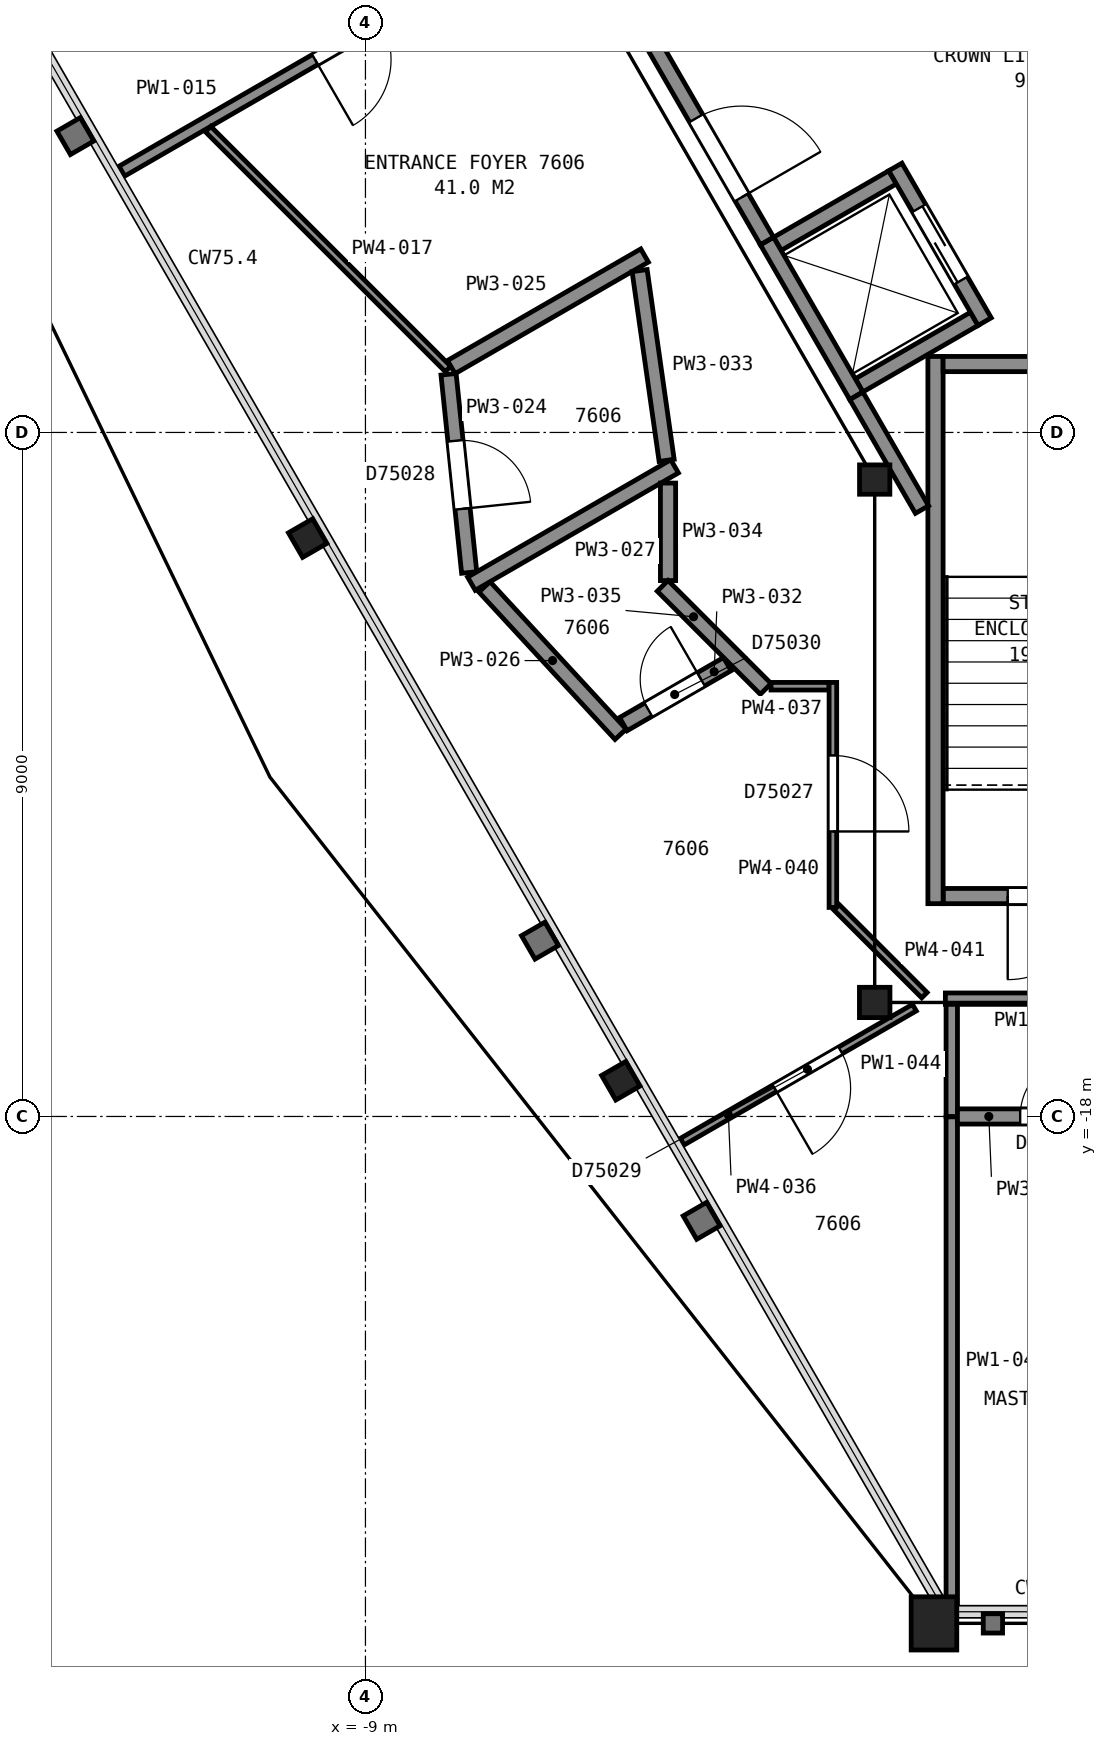
"""IFC4 building model, lengths in metres.
Left out: names, types, materials, properties, quantities, classifications, styles, units other than length and angle.
Written with IfcOpenShell. Run it as: python <this file> out.ifc"""

import sys

from ifc_helpers import new_model, si_unit, direction, frame, frame_2d, origin, origin_2d, place, context, subcontext, project, spatial, rectangle, hollow_rectangle, i_section, extrude, element, fill, save


model = new_model("IFC4")
c1 = context("Model", 3, precision=1e-05, world=origin(), true_north=direction((0.0, 1.0)))
c2 = subcontext(c1, "Body", "Model", "MODEL_VIEW")
j1 = project(units=[si_unit("LENGTHUNIT", "METRE"), si_unit("PLANEANGLEUNIT", "RADIAN")], contexts=[c1])
p1 = place(None, origin())
s1 = spatial("IfcSite", under=j1, at=p1, CompositionType="ELEMENT")
p2 = place(p1, origin())
s2 = spatial("IfcBuilding", under=s1, at=p2, CompositionType="ELEMENT")
p3 = place(p2, frame((0.0, 0.0, 301.0)))
s3 = spatial("IfcBuildingStorey", under=s2, at=p3, CompositionType="ELEMENT", Elevation=301.0)
p4 = place(p3, frame((-9.76, -10.39, 0.0), z_axis=(0.0, 0.0, 1.0), x_axis=(-0.5, 0.866025403784, 0.0)))
e1 = element("IfcColumn", 1, at=p4, inside=s3, PredefinedType="COLUMN", context=c2, shape_type="SweptSolid", body=[
    extrude(i_section(OverallWidth=0.373, OverallDepth=0.368, WebThickness=0.015, FlangeThickness=0.024, FilletRadius=0.015, at=origin_2d()), origin(), (0.0, 0.0, 1.0), 3.655),
])
p5 = place(p3, frame((-5.64, -17.53, 0.0), z_axis=(0.0, 0.0, 1.0), x_axis=(-0.5, 0.866025403784, 0.0)))
e2 = element("IfcColumn", 2, at=p5, inside=s3, PredefinedType="COLUMN", context=c2, shape_type="SweptSolid", body=[
    extrude(i_section(OverallWidth=0.373, OverallDepth=0.368, WebThickness=0.015, FlangeThickness=0.024, FilletRadius=0.015, at=origin_2d()), origin(), (0.0, 0.0, 1.0), 3.645),
])
p6 = place(p3, frame((-1.52, -24.67, 0.0), z_axis=(0.0, 0.0, 1.0), x_axis=(-1.0, 0.0, 0.0)))
e3 = element("IfcColumn", 3, at=p6, inside=s3, PredefinedType="COLUMN", context=c2, shape_type="SweptSolid", body=[
    extrude(hollow_rectangle(XDim=0.6, YDim=0.7, WallThickness=0.04, at=origin_2d()), origin(), (0.0, 0.0, 1.0), 3.61),
])
p7 = place(p3, frame((-2.3, -9.62, 0.0), z_axis=(0.0, 0.0, 1.0), x_axis=(1.0, 0.0, 0.0)))
e4 = element("IfcColumn", 4, at=p7, inside=s3, PredefinedType="COLUMN", context=c2, shape_type="SweptSolid", body=[
    extrude(i_section(OverallWidth=0.399, OverallDepth=0.386, WebThickness=0.021, FlangeThickness=0.033, FilletRadius=0.015, at=origin_2d()), origin(), (0.0, 0.0, 1.0), 3.7),
])
p8 = place(p3, frame((-2.3, -16.5, 0.0), z_axis=(0.0, 0.0, 1.0), x_axis=(-1.0, 0.0, 0.0)))
e5 = element("IfcColumn", 5, at=p8, inside=s3, PredefinedType="COLUMN", context=c2, shape_type="SweptSolid", body=[
    extrude(i_section(OverallWidth=0.401, OverallDepth=0.399, WebThickness=0.025, FlangeThickness=0.04, FilletRadius=0.015, at=origin_2d()), origin(), (0.0, 0.0, 1.0), 3.7),
])
p9 = place(p3, frame((-1.4, -15.1, 0.0), z_axis=(0.0, 0.0, 1.0), x_axis=(1.0, 0.0, 0.0)))
e6 = element("IfcWall", 6, at=p9, inside=s3, PredefinedType="PARTITIONING", context=c2, shape_type="SweptSolid", body=[
    extrude(rectangle(XDim=2.8, YDim=0.2, at=frame_2d((1.4, 0.0))), origin(), (0.0, 0.0, 1.0), 3.45),
])
p10 = place(p9, frame((0.85, 0.0, 0.0)))
e7 = element("IfcOpeningElement", 7, at=p10, cuts=e6, PredefinedType="OPENING", context=c2, shape_type="SweptSolid", body=[
    extrude(rectangle(XDim=1.1, YDim=2.1, at=frame_2d((0.55, 1.05))), frame((0.0, 0.11, 0.0), z_axis=(0.0, -1.0, 0.0), x_axis=(1.0, 0.0, 0.0)), (0.0, 0.0, 1.0), 0.22),
])
p11 = place(p3, frame((-1.5, -8.0, 0.0), z_axis=(0.0, 0.0, 1.0), x_axis=(0.0, -1.0, 0.0)))
e8 = element("IfcWall", 8, at=p11, inside=s3, PredefinedType="PARTITIONING", context=c2, shape_type="SweptSolid", body=[
    extrude(rectangle(XDim=7.2, YDim=0.2, at=frame_2d((3.6, 0.0))), origin(), (0.0, 0.0, 1.0), 3.45),
])
p12 = place(p3, frame((-1.4, -8.1, 0.0), z_axis=(0.0, 0.0, 1.0), x_axis=(1.0, 0.0, 0.0)))
e9 = element("IfcWall", 9, at=p12, inside=s3, PredefinedType="PARTITIONING", context=c2, shape_type="SweptSolid", body=[
    extrude(rectangle(XDim=2.8, YDim=0.2, at=frame_2d((1.4, 0.0))), origin(), (0.0, 0.0, 1.0), 3.45),
])
for number, where, z_axis, x_axis in (
    (10, (-2.505, -8.38, 0.0), (0.0, 0.0, 1.0), (0.866, 0.5, 0.0)),
    (11, (-3.58, -6.519, 0.0), (0.0, 0.0, 1.0), (0.866, 0.5, 0.0)),
):
    element("IfcWall", number, at=place(p3, frame(where, z_axis=z_axis, x_axis=x_axis)), inside=s3, PredefinedType="PARTITIONING", context=c2, shape_type="SweptSolid", body=[
        extrude(rectangle(XDim=1.75, YDim=0.2, at=frame_2d((0.875, 0.0))), origin(), (0.0, 0.0, 1.0), 3.7),
    ])
p13 = place(p3, frame((-0.853, -7.542, 0.0), z_axis=(0.0, 0.0, 1.0), x_axis=(-0.500016218704, 0.866016039709, 0.0)))
e12 = element("IfcWall", 12, at=p13, inside=s3, PredefinedType="PARTITIONING", context=c2, shape_type="SweptSolid", body=[
    extrude(rectangle(XDim=2.35, YDim=0.2, at=frame_2d((1.175, 0.0))), origin(), (0.0, 0.0, 1.0), 3.7),
])
p14 = place(p13, frame((0.625, 0.0, 0.0)))
e13 = element("IfcOpeningElement", 13, at=p14, cuts=e12, PredefinedType="OPENING", context=c2, shape_type="SweptSolid", body=[
    extrude(rectangle(XDim=1.1, YDim=2.1, at=frame_2d((0.55, 1.05))), frame((0.0, 0.11, 0.0), z_axis=(0.0, -1.0, 0.0), x_axis=(1.0, 0.0, 0.0)), (0.0, 0.0, 1.0), 0.22),
])
p15 = place(p3, frame((-2.542, -8.517, 0.0), z_axis=(0.0, 0.0, 1.0), x_axis=(-0.500016218704, 0.866016039709, 0.0)))
e14 = element("IfcWall", 14, at=p15, inside=s3, PredefinedType="PARTITIONING", context=c2, shape_type="SweptSolid", body=[
    extrude(rectangle(XDim=2.35, YDim=0.2, at=frame_2d((1.175, 0.0))), origin(), (0.0, 0.0, 1.0), 3.7),
])
p16 = place(p3, frame((-7.141, -0.551, 0.0), z_axis=(0.0, 0.0, 1.0), x_axis=(0.500001302854, -0.86602465158, 0.0)))
e15 = element("IfcWall", 15, at=p16, inside=s3, PredefinedType="PARTITIONING", context=c2, shape_type="SweptSolid", body=[
    extrude(rectangle(XDim=6.846, YDim=0.2, at=frame_2d((3.423, 0.0))), origin(), (0.0, 0.0, 1.0), 3.45),
])
p17 = place(p16, frame((4.983, 0.0, 0.0)))
e16 = element("IfcOpeningElement", 16, at=p17, cuts=e15, PredefinedType="OPENING", context=c2, shape_type="SweptSolid", body=[
    extrude(rectangle(XDim=1.2, YDim=2.1, at=frame_2d((0.6, 1.05))), frame((0.0, 0.11, 0.0), z_axis=(0.0, -1.0, 0.0), x_axis=(1.0, 0.0, 0.0)), (0.0, 0.0, 1.0), 0.22),
])
p18 = place(p3, frame((-2.541, -8.519, 0.0), z_axis=(0.0, 0.0, 1.0), x_axis=(0.500016142392, -0.86601608377, 0.0)))
e17 = element("IfcWall", 17, at=p18, inside=s3, PredefinedType="PARTITIONING", context=c2, shape_type="SweptSolid", body=[
    extrude(rectangle(XDim=1.727, YDim=0.2, at=frame_2d((0.864, 0.0))), origin(), (0.0, 0.0, 1.0), 3.45),
])
p19 = place(p3, frame((-12.205, -5.562, 0.0), z_axis=(0.0, 0.0, 1.0), x_axis=(0.866006351856, 0.500032997455, 0.0)))
e18 = element("IfcWall", 18, at=p19, inside=s3, PredefinedType="PARTITIONING", context=c2, shape_type="SweptSolid", body=[
    extrude(rectangle(XDim=5.671, YDim=0.15, at=frame_2d((2.835, 0.0))), origin(), (0.0, 0.0, 1.0), 2.723),
])
p20 = place(p19, frame((2.935, 0.0, 0.0)))
e19 = element("IfcOpeningElement", 19, at=p20, cuts=e18, PredefinedType="OPENING", context=c2, shape_type="SweptSolid", body=[
    extrude(rectangle(XDim=1.0, YDim=2.1, at=frame_2d((0.5, 1.05))), frame((0.0, 0.085, 0.0), z_axis=(0.0, -1.0, 0.0), x_axis=(1.0, 0.0, 0.0)), (0.0, 0.0, 1.0), 0.17),
])
p21 = place(p3, frame((-11.071, -5.008, 0.0), z_axis=(0.0, 0.0, 1.0), x_axis=(0.707079435951, -0.707134125365, 0.0)))
e20 = element("IfcWall", 20, at=p21, inside=s3, PredefinedType="PARTITIONING", context=c2, shape_type="SweptSolid", body=[
    extrude(rectangle(XDim=4.464, YDim=0.1, at=frame_2d((2.232, 0.0))), origin(), (0.0, 0.0, 1.0), 2.723),
])
p22 = place(p3, frame((-7.907, -8.235, 0.0), z_axis=(0.0, 0.0, 1.0), x_axis=(0.103623353624, -0.994616609847, 0.0)))
e21 = element("IfcWall", 21, at=p22, inside=s3, PredefinedType="PARTITIONING", context=c2, shape_type="SweptSolid", body=[
    extrude(rectangle(XDim=2.622, YDim=0.2, at=frame_2d((1.311, 0.0))), origin(), (0.0, 0.0, 1.0), 2.723),
])
p23 = place(p22, frame((0.88, 0.0, 0.0)))
e22 = element("IfcOpeningElement", 22, at=p23, cuts=e21, PredefinedType="OPENING", context=c2, shape_type="SweptSolid", body=[
    extrude(rectangle(XDim=0.9, YDim=2.1, at=frame_2d((0.45, 1.05))), frame((0.0, 0.11, 0.0), z_axis=(0.0, -1.0, 0.0), x_axis=(1.0, 0.0, 0.0)), (0.0, 0.0, 1.0), 0.22),
])
p24 = place(p3, frame((-7.871, -8.14, 0.0), z_axis=(0.0, 0.0, 1.0), x_axis=(0.866106676517, 0.49985920507, 0.0)))
e23 = element("IfcWall", 23, at=p24, inside=s3, PredefinedType="PARTITIONING", context=c2, shape_type="SweptSolid", body=[
    extrude(rectangle(XDim=2.936, YDim=0.2, at=frame_2d((1.468, 0.0))), origin(), (0.0, 0.0, 1.0), 2.723),
])
p25 = place(p3, frame((-7.434, -11.032, 0.0), z_axis=(0.0, 0.0, 1.0), x_axis=(0.678387636859, -0.734704167782, 0.0)))
e24 = element("IfcWall", 24, at=p25, inside=s3, PredefinedType="PARTITIONING", context=c2, shape_type="SweptSolid", body=[
    extrude(rectangle(XDim=2.64, YDim=0.2, at=frame_2d((1.32, 0.0))), origin(), (0.0, 0.0, 1.0), 2.723),
])
p26 = place(p3, frame((-7.606, -10.99, 0.0), z_axis=(0.0, 0.0, 1.0), x_axis=(0.865956409518, 0.500119482538, 0.0)))
e25 = element("IfcWall", 25, at=p26, inside=s3, PredefinedType="PARTITIONING", context=c2, shape_type="SweptSolid", body=[
    extrude(rectangle(XDim=3.087, YDim=0.2, at=frame_2d((1.543, 0.0))), origin(), (0.0, 0.0, 1.0), 2.723),
])
p27 = place(p3, frame((-5.607, -12.838, 0.0), z_axis=(0.0, 0.0, 1.0), x_axis=(0.866095534226, 0.499878510834, 0.0)))
e26 = element("IfcWall", 26, at=p27, inside=s3, PredefinedType="PARTITIONING", context=c2, shape_type="SweptSolid", body=[
    extrude(rectangle(XDim=1.58, YDim=0.2, at=frame_2d((0.79, 0.0))), origin(), (0.0, 0.0, 1.0), 2.723),
])
p28 = place(p27, frame((0.38, 0.0, 0.0)))
e27 = element("IfcOpeningElement", 27, at=p28, cuts=e26, PredefinedType="OPENING", context=c2, shape_type="SweptSolid", body=[
    extrude(rectangle(XDim=0.8, YDim=2.1, at=frame_2d((0.4, 1.05))), frame((0.0, 0.11, 0.0), z_axis=(0.0, -1.0, 0.0), x_axis=(1.0, 0.0, 0.0)), (0.0, 0.0, 1.0), 0.22),
])
p29 = place(p3, frame((-5.393, -6.871, 0.0), z_axis=(0.0, 0.0, 1.0), x_axis=(0.140960508483, -0.990015219604, 0.0)))
e28 = element("IfcWall", 28, at=p29, inside=s3, PredefinedType="PARTITIONING", context=c2, shape_type="SweptSolid", body=[
    extrude(rectangle(XDim=2.522, YDim=0.2, at=frame_2d((1.261, 0.0))), origin(), (0.0, 0.0, 1.0), 2.723),
])
p30 = place(p3, frame((-5.019, -10.949, 0.0), z_axis=(0.0, 0.0, 1.0), x_axis=(0.0, 1.0, 0.0)))
e29 = element("IfcWall", 29, at=p30, inside=s3, PredefinedType="PARTITIONING", context=c2, shape_type="SweptSolid", body=[
    extrude(rectangle(XDim=1.283, YDim=0.2, at=frame_2d((0.642, 0.0))), origin(), (0.0, 0.0, 1.0), 2.723),
])
p31 = place(p3, frame((-5.09, -11.018, 0.0), z_axis=(0.0, 0.0, 1.0), x_axis=(0.707106781187, -0.707106781187, 0.0)))
e30 = element("IfcWall", 30, at=p31, inside=s3, PredefinedType="PARTITIONING", context=c2, shape_type="SweptSolid", body=[
    extrude(rectangle(XDim=1.918, YDim=0.2, at=frame_2d((0.959, 0.0))), origin(), (0.0, 0.0, 1.0), 2.723),
])
p32 = place(p3, frame((-1.778, -16.568, 0.0), z_axis=(0.0, 0.0, 1.0), x_axis=(-0.866019606374, -0.500010041276, 0.0)))
e31 = element("IfcWall", 31, at=p32, inside=s3, PredefinedType="PARTITIONING", context=c2, shape_type="SweptSolid", body=[
    extrude(rectangle(XDim=3.527, YDim=0.1, at=frame_2d((1.764, 0.0))), origin(), (0.0, 0.0, 1.0), 2.723),
])
p33 = place(p32, frame((1.124, 0.0, 0.0)))
e32 = element("IfcOpeningElement", 32, at=p33, cuts=e31, PredefinedType="OPENING", context=c2, shape_type="SweptSolid", body=[
    extrude(rectangle(XDim=1.0, YDim=2.1, at=frame_2d((0.5, 1.05))), frame((0.0, 0.06, 0.0), z_axis=(0.0, -1.0, 0.0), x_axis=(1.0, 0.0, 0.0)), (0.0, 0.0, 1.0), 0.12),
])
p34 = place(p3, frame((-3.664, -12.339, 0.0), z_axis=(0.0, 0.0, 1.0), x_axis=(1.0, 0.0, 0.0)))
e33 = element("IfcWall", 33, at=p34, inside=s3, PredefinedType="PARTITIONING", context=c2, shape_type="SweptSolid", body=[
    extrude(rectangle(XDim=0.764, YDim=0.1, at=frame_2d((0.382, 0.0))), origin(), (0.0, 0.0, 1.0), 2.723),
])
p35 = place(p3, frame((-2.85, -15.25, 0.0), z_axis=(0.0, 0.0, 1.0), x_axis=(0.0, 1.0, 0.0)))
e34 = element("IfcWall", 34, at=p35, inside=s3, PredefinedType="PARTITIONING", context=c2, shape_type="SweptSolid", body=[
    extrude(rectangle(XDim=2.961, YDim=0.1, at=frame_2d((1.48, 0.0))), origin(), (0.0, 0.0, 1.0), 2.723),
])
p36 = place(p35, frame((1.0, 0.0, 0.0)))
e35 = element("IfcOpeningElement", 35, at=p36, cuts=e34, PredefinedType="OPENING", context=c2, shape_type="SweptSolid", body=[
    extrude(rectangle(XDim=1.0, YDim=2.1, at=frame_2d((0.5, 1.05))), frame((0.0, 0.06, 0.0), z_axis=(0.0, -1.0, 0.0), x_axis=(1.0, 0.0, 0.0)), (0.0, 0.0, 1.0), 0.12),
])
p37 = place(p3, frame((-2.801, -15.25, 0.0), z_axis=(0.0, 0.0, 1.0), x_axis=(0.707181547962, -0.707032006505, 0.0)))
e36 = element("IfcWall", 36, at=p37, inside=s3, PredefinedType="PARTITIONING", context=c2, shape_type="SweptSolid", body=[
    extrude(rectangle(XDim=1.633, YDim=0.1, at=frame_2d((0.816, 0.0))), origin(), (0.0, 0.0, 1.0), 2.723),
])
p38 = place(p3, frame((-1.37, -16.45, 0.0), z_axis=(0.0, 0.0, 1.0), x_axis=(1.0, 0.0, 0.0)))
e37 = element("IfcWall", 37, at=p38, inside=s3, PredefinedType="PARTITIONING", context=c2, shape_type="SweptSolid", body=[
    extrude(rectangle(XDim=2.345, YDim=0.15, at=frame_2d((1.173, 0.0))), origin(), (0.0, 0.0, 1.0), 2.723),
])
p39 = place(p3, frame((-1.286, -24.421, 0.0), z_axis=(0.0, 0.0, 1.0), x_axis=(0.0, 1.0, 0.0)))
e38 = element("IfcWall", 38, at=p39, inside=s3, PredefinedType="PARTITIONING", context=c2, shape_type="SweptSolid", body=[
    extrude(rectangle(XDim=6.416, YDim=0.15, at=frame_2d((3.208, 0.0))), origin(), (0.0, 0.0, 1.0), 2.723),
])
p40 = place(p3, frame((-1.286, -18.0, 0.0), z_axis=(0.0, 0.0, 1.0), x_axis=(0.0, 1.0, 0.0)))
e39 = element("IfcWall", 39, at=p40, inside=s3, PredefinedType="PARTITIONING", context=c2, shape_type="SweptSolid", body=[
    extrude(rectangle(XDim=1.475, YDim=0.15, at=frame_2d((0.738, 0.0))), origin(), (0.0, 0.0, 1.0), 2.723),
])
p41 = place(p3, frame((-1.211, -18.0, 0.0), z_axis=(0.0, 0.0, 1.0), x_axis=(1.0, 0.0, 0.0)))
e40 = element("IfcWall", 40, at=p41, inside=s3, PredefinedType="PARTITIONING", context=c2, shape_type="SweptSolid", body=[
    extrude(rectangle(XDim=2.411, YDim=0.2, at=frame_2d((1.206, 0.0))), origin(), (0.0, 0.0, 1.0), 2.723),
])
p42 = place(p41, frame((0.825, 0.0, 0.0)))
e41 = element("IfcOpeningElement", 41, at=p42, cuts=e40, PredefinedType="OPENING", context=c2, shape_type="SweptSolid", body=[
    extrude(rectangle(XDim=0.8, YDim=2.1, at=frame_2d((0.4, 1.05))), frame((0.0, 0.11, 0.0), z_axis=(0.0, -1.0, 0.0), x_axis=(1.0, 0.0, 0.0)), (0.0, 0.0, 1.0), 0.22),
])
p43 = place(p10, origin())
e42 = element("IfcDoor", 42, at=p43, inside=s3, OperationType="SINGLE_SWING_LEFT", PredefinedType="DOOR", context=c2, shape_type="SweptSolid", body=[
    extrude(rectangle(XDim=1.1, YDim=2.1, at=frame_2d((0.55, 1.05))), frame((0.0, 0.025, 0.0), z_axis=(0.0, -1.0, 0.0), x_axis=(1.0, 0.0, 0.0)), (0.0, 0.0, 1.0), 0.05),
])
fill(e7, e42)
p44 = place(p14, origin())
e43 = element("IfcDoor", 43, at=p44, inside=s3, OperationType="SLIDING_TO_LEFT", PredefinedType="DOOR", context=c2, shape_type="SweptSolid", body=[
    extrude(rectangle(XDim=1.1, YDim=2.1, at=frame_2d((0.55, 1.05))), frame((0.0, 0.025, 0.0), z_axis=(0.0, -1.0, 0.0), x_axis=(1.0, 0.0, 0.0)), (0.0, 0.0, 1.0), 0.05),
])
fill(e13, e43)
p45 = place(p17, origin())
e44 = element("IfcDoor", 44, at=p45, inside=s3, OperationType="SINGLE_SWING_RIGHT", PredefinedType="DOOR", context=c2, shape_type="SweptSolid", body=[
    extrude(rectangle(XDim=1.2, YDim=2.1, at=frame_2d((0.6, 1.05))), frame((0.0, 0.025, 0.0), z_axis=(0.0, -1.0, 0.0), x_axis=(1.0, 0.0, 0.0)), (0.0, 0.0, 1.0), 0.05),
])
fill(e16, e44)
p46 = place(p20, origin())
e45 = element("IfcDoor", 45, at=p46, inside=s3, OperationType="SINGLE_SWING_LEFT", PredefinedType="DOOR", context=c2, shape_type="SweptSolid", body=[
    extrude(rectangle(XDim=1.0, YDim=2.1, at=frame_2d((0.5, 1.05))), frame((0.0, 0.025, 0.0), z_axis=(0.0, -1.0, 0.0), x_axis=(1.0, 0.0, 0.0)), (0.0, 0.0, 1.0), 0.05),
])
fill(e19, e45)
p47 = place(p23, origin())
e46 = element("IfcDoor", 46, at=p47, inside=s3, OperationType="SINGLE_SWING_RIGHT", PredefinedType="DOOR", context=c2, shape_type="SweptSolid", body=[
    extrude(rectangle(XDim=0.9, YDim=2.1, at=frame_2d((0.45, 1.05))), frame((0.0, 0.025, 0.0), z_axis=(0.0, -1.0, 0.0), x_axis=(1.0, 0.0, 0.0)), (0.0, 0.0, 1.0), 0.05),
])
fill(e22, e46)
p48 = place(p28, origin())
e47 = element("IfcDoor", 47, at=p48, inside=s3, OperationType="SINGLE_SWING_RIGHT", PredefinedType="DOOR", context=c2, shape_type="SweptSolid", body=[
    extrude(rectangle(XDim=0.8, YDim=2.1, at=frame_2d((0.4, 1.05))), frame((0.0, 0.025, 0.0), z_axis=(0.0, -1.0, 0.0), x_axis=(1.0, 0.0, 0.0)), (0.0, 0.0, 1.0), 0.05),
])
fill(e27, e47)
p49 = place(p33, origin())
e48 = element("IfcDoor", 48, at=p49, inside=s3, OperationType="SINGLE_SWING_RIGHT", PredefinedType="DOOR", context=c2, shape_type="SweptSolid", body=[
    extrude(rectangle(XDim=1.0, YDim=2.1, at=frame_2d((0.5, 1.05))), frame((0.0, 0.025, 0.0), z_axis=(0.0, -1.0, 0.0), x_axis=(1.0, 0.0, 0.0)), (0.0, 0.0, 1.0), 0.05),
])
fill(e32, e48)
p50 = place(p36, origin())
e49 = element("IfcDoor", 49, at=p50, inside=s3, OperationType="SINGLE_SWING_LEFT", PredefinedType="DOOR", context=c2, shape_type="SweptSolid", body=[
    extrude(rectangle(XDim=1.0, YDim=2.1, at=frame_2d((0.5, 1.05))), frame((0.0, 0.025, 0.0), z_axis=(0.0, -1.0, 0.0), x_axis=(1.0, 0.0, 0.0)), (0.0, 0.0, 1.0), 0.05),
])
fill(e35, e49)
p51 = place(p42, origin())
e50 = element("IfcDoor", 50, at=p51, inside=s3, OperationType="SINGLE_SWING_RIGHT", PredefinedType="DOOR", context=c2, shape_type="SweptSolid", body=[
    extrude(rectangle(XDim=0.8, YDim=2.1, at=frame_2d((0.4, 1.05))), frame((0.0, 0.025, 0.0), z_axis=(0.0, -1.0, 0.0), x_axis=(1.0, 0.0, 0.0)), (0.0, 0.0, 1.0), 0.05),
])
fill(e41, e50)
save(model, sys.argv[1])
